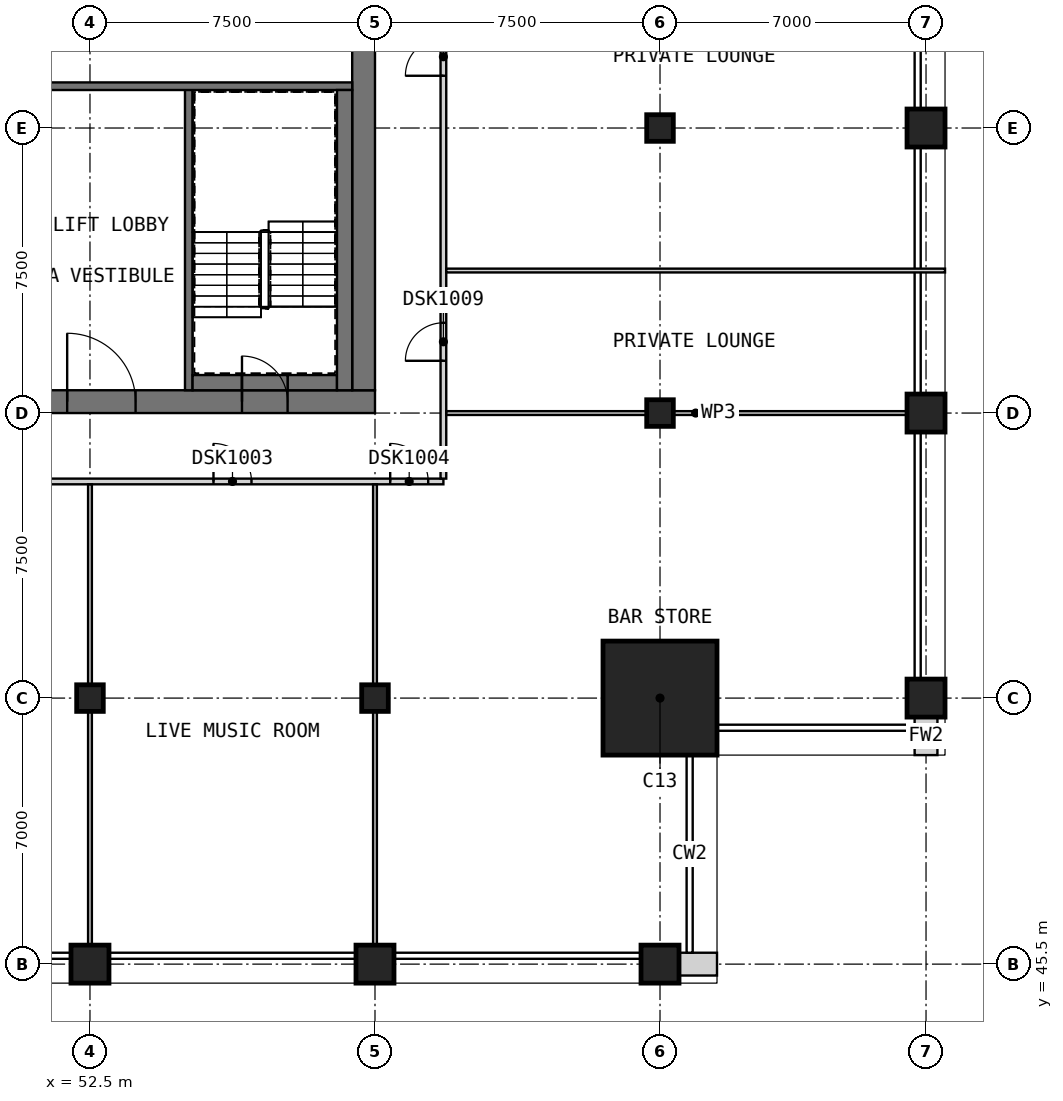
"""IFC4 building model, lengths in metres.
Left out: names, types, materials, properties, quantities, classifications, styles, units other than length and angle.
Written with IfcOpenShell. Run it as: python <this file> out.ifc"""

import sys

from ifc_helpers import new_model, si_unit, direction, frame, frame_2d, origin, origin_2d, place, context, subcontext, project, spatial, rectangle, extrude, element, fill, save


model = new_model("IFC4")
c1 = context("Model", 3, precision=1e-05, world=origin(), true_north=direction((0.0, 1.0)))
c2 = subcontext(c1, "Body", "Model", "MODEL_VIEW")
j1 = project(units=[si_unit("LENGTHUNIT", "METRE"), si_unit("PLANEANGLEUNIT", "RADIAN")], contexts=[c1])
p1 = place(None, origin())
s1 = spatial("IfcSite", under=j1, at=p1, CompositionType="ELEMENT")
p2 = place(p1, origin())
s2 = spatial("IfcBuilding", under=s1, at=p2, CompositionType="ELEMENT")
p3 = place(p2, frame((0.0, 0.0, 297.7)))
s3 = spatial("IfcBuildingStorey", under=s2, at=p3, CompositionType="ELEMENT", Elevation=297.7)
p4 = place(p3, frame((52.5, 45.5, 0.0), z_axis=(0.0, 0.0, 1.0), x_axis=(1.0, 0.0, 0.0)))
e1 = element("IfcColumn", 1, at=p4, inside=s3, PredefinedType="COLUMN", context=c2, shape_type="SweptSolid", body=[
    extrude(rectangle(XDim=1.0, YDim=1.0, at=origin_2d()), origin(), (0.0, 0.0, 1.0), 5.0),
])
p5 = place(p3, frame((52.5, 52.5, 0.0), z_axis=(0.0, 0.0, 1.0), x_axis=(1.0, 0.0, 0.0)))
e2 = element("IfcColumn", 2, at=p5, inside=s3, PredefinedType="COLUMN", context=c2, shape_type="SweptSolid", body=[
    extrude(rectangle(XDim=0.7, YDim=0.7, at=origin_2d()), origin(), (0.0, 0.0, 1.0), 5.0),
])
p6 = place(p3, frame((60.0, 45.5, 0.0), z_axis=(0.0, 0.0, 1.0), x_axis=(1.0, 0.0, 0.0)))
e3 = element("IfcColumn", 3, at=p6, inside=s3, PredefinedType="COLUMN", context=c2, shape_type="SweptSolid", body=[
    extrude(rectangle(XDim=1.0, YDim=1.0, at=origin_2d()), origin(), (0.0, 0.0, 1.0), 5.0),
])
p7 = place(p3, frame((60.0, 52.5, 0.0), z_axis=(0.0, 0.0, 1.0), x_axis=(1.0, 0.0, 0.0)))
e4 = element("IfcColumn", 4, at=p7, inside=s3, PredefinedType="COLUMN", context=c2, shape_type="SweptSolid", body=[
    extrude(rectangle(XDim=0.7, YDim=0.7, at=origin_2d()), origin(), (0.0, 0.0, 1.0), 5.0),
])
p8 = place(p3, frame((67.5, 45.5, 0.0), z_axis=(0.0, 0.0, 1.0), x_axis=(1.0, 0.0, 0.0)))
e5 = element("IfcColumn", 5, at=p8, inside=s3, PredefinedType="COLUMN", context=c2, shape_type="SweptSolid", body=[
    extrude(rectangle(XDim=1.0, YDim=1.0, at=origin_2d()), origin(), (0.0, 0.0, 1.0), 5.0),
])
for number, where, z_axis, x_axis in (
    (6, (67.5, 60.0, 0.0), (0.0, 0.0, 1.0), (1.0, 0.0, 0.0)),
    (7, (67.5, 67.5, 0.0), (0.0, 0.0, 1.0), (1.0, 0.0, 0.0)),
):
    element("IfcColumn", number, at=place(p3, frame(where, z_axis=z_axis, x_axis=x_axis)), inside=s3, PredefinedType="COLUMN", context=c2, shape_type="SweptSolid", body=[
        extrude(rectangle(XDim=0.7, YDim=0.7, at=origin_2d()), origin(), (0.0, 0.0, 1.0), 5.0),
    ])
for number, where, z_axis, x_axis in (
    (8, (74.5, 52.5, 0.0), (0.0, 0.0, 1.0), (1.0, 0.0, 0.0)),
    (9, (74.5, 60.0, 0.0), (0.0, 0.0, 1.0), (1.0, 0.0, 0.0)),
    (10, (74.5, 67.5, 0.0), (0.0, 0.0, 1.0), (1.0, 0.0, 0.0)),
):
    element("IfcColumn", number, at=place(p3, frame(where, z_axis=z_axis, x_axis=x_axis)), inside=s3, PredefinedType="COLUMN", context=c2, shape_type="SweptSolid", body=[
        extrude(rectangle(XDim=1.0, YDim=1.0, at=origin_2d()), origin(), (0.0, 0.0, 1.0), 5.0),
    ])
p9 = place(p3, frame((67.5, 52.5, 0.0), z_axis=(0.0, 0.0, 1.0), x_axis=(1.0, 0.0, 0.0)))
e11 = element("IfcColumn", 11, at=p9, inside=s3, PredefinedType="COLUMN", context=c2, shape_type="SweptSolid", body=[
    extrude(rectangle(XDim=3.0, YDim=3.0, at=origin_2d()), origin(), (0.0, 0.0, 1.0), 5.0),
])
p10 = place(p3, frame((30.0, 60.3, 0.0), z_axis=(0.0, 0.0, 1.0), x_axis=(1.0, 0.0, 0.0)))
e12 = element("IfcWall", 12, at=p10, inside=s3, PredefinedType="SHEAR", context=c2, shape_type="SweptSolid", body=[
    extrude(rectangle(XDim=30.0, YDim=0.6, at=frame_2d((15.0, 0.0))), origin(), (0.0, 0.0, 1.0), 5.0),
])
p11 = place(p10, frame((21.9, 0.0, 0.0)))
e13 = element("IfcOpeningElement", 13, at=p11, cuts=e12, PredefinedType="OPENING", context=c2, shape_type="SweptSolid", body=[
    extrude(rectangle(XDim=1.8, YDim=2.1, at=frame_2d((0.9, 1.05))), frame((0.0, 0.31, 0.0), z_axis=(0.0, -1.0, 0.0), x_axis=(1.0, 0.0, 0.0)), (0.0, 0.0, 1.0), 0.62),
])
p12 = place(p10, frame((26.5, 0.0, 0.0)))
e14 = element("IfcOpeningElement", 14, at=p12, cuts=e12, PredefinedType="OPENING", context=c2, shape_type="SweptSolid", body=[
    extrude(rectangle(XDim=1.2, YDim=2.1, at=frame_2d((0.6, 1.05))), frame((0.0, 0.31, 0.0), z_axis=(0.0, -1.0, 0.0), x_axis=(1.0, 0.0, 0.0)), (0.0, 0.0, 1.0), 0.62),
])
p13 = place(p3, frame((59.7, 60.6, 0.0), z_axis=(0.0, 0.0, 1.0), x_axis=(0.0, 1.0, 0.0)))
e15 = element("IfcWall", 15, at=p13, inside=s3, PredefinedType="SHEAR", context=c2, shape_type="SweptSolid", body=[
    extrude(rectangle(XDim=21.3, YDim=0.6, at=frame_2d((10.65, 0.0))), origin(), (0.0, 0.0, 1.0), 5.0),
])
p14 = place(p13, frame((14.9, 0.0, 0.0)))
e16 = element("IfcOpeningElement", 16, at=p14, cuts=e15, PredefinedType="OPENING", context=c2, shape_type="SweptSolid", body=[
    extrude(rectangle(XDim=1.8, YDim=2.1, at=frame_2d((0.9, 1.05))), frame((0.0, 0.31, 0.0), z_axis=(0.0, -1.0, 0.0), x_axis=(1.0, 0.0, 0.0)), (0.0, 0.0, 1.0), 0.62),
])
for number, where, z_axis, x_axis in (
    (17, (68.0, 45.5, 0.0), (0.0, 0.0, 1.0), (1.0, 0.0, 0.0)),
    (18, (74.5, 51.0, 0.0), (0.0, 0.0, 1.0), (0.0, 1.0, 0.0)),
):
    element("IfcWall", number, at=place(p3, frame(where, z_axis=z_axis, x_axis=x_axis)), inside=s3, PredefinedType="SOLIDWALL", context=c2, shape_type="SweptSolid", body=[
        extrude(rectangle(XDim=1.0, YDim=0.6, at=frame_2d((0.5, 0.0))), origin(), (0.0, 0.0, 1.0), 4.7),
    ])
p15 = place(p3, frame((55.1, 60.6, 0.0), z_axis=(0.0, 0.0, 1.0), x_axis=(0.0, 1.0, 0.0)))
e19 = element("IfcWall", 19, at=p15, inside=s3, PredefinedType="SOLIDWALL", context=c2, shape_type="SweptSolid", body=[
    extrude(rectangle(XDim=8.0, YDim=0.2, at=frame_2d((4.0, 0.0))), origin(), (0.0, 0.0, 1.0), 4.7),
])
p16 = place(p3, frame((51.1, 68.6, 0.0), z_axis=(0.0, 0.0, 1.0), x_axis=(1.0, 0.0, 0.0)))
e20 = element("IfcWall", 20, at=p16, inside=s3, PredefinedType="SOLIDWALL", context=c2, shape_type="SweptSolid", body=[
    extrude(rectangle(XDim=8.3, YDim=0.2, at=frame_2d((4.15, 0.0))), origin(), (0.0, 0.0, 1.0), 4.7),
])
for number, where, z_axis, x_axis in (
    (21, (55.2, 60.8, 0.0), (0.0, 0.0, 1.0), (1.0, 0.0, 0.0)),
    (22, (57.7, 60.8, 0.0), (0.0, 0.0, 1.0), (1.0, 0.0, 0.0)),
):
    element("IfcWall", number, at=place(p3, frame(where, z_axis=z_axis, x_axis=x_axis)), inside=s3, PredefinedType="SOLIDWALL", context=c2, shape_type="SweptSolid", body=[
        extrude(rectangle(XDim=1.3, YDim=0.4, at=frame_2d((0.65, 0.0))), origin(), (0.0, 0.0, 1.0), 4.7),
    ])
p17 = place(p3, frame((59.2, 60.6, 0.0), z_axis=(0.0, 0.0, 1.0), x_axis=(0.0, 1.0, 0.0)))
e23 = element("IfcWall", 23, at=p17, inside=s3, PredefinedType="SOLIDWALL", context=c2, shape_type="SweptSolid", body=[
    extrude(rectangle(XDim=7.9, YDim=0.4, at=frame_2d((3.95, 0.0))), origin(), (0.0, 0.0, 1.0), 4.7),
])
p18 = place(p3, frame((56.5, 60.8, 3.2), z_axis=(0.0, 0.0, 1.0), x_axis=(1.0, 0.0, 0.0)))
e24 = element("IfcWall", 24, at=p18, inside=s3, PredefinedType="SOLIDWALL", context=c2, shape_type="SweptSolid", body=[
    extrude(rectangle(XDim=1.2, YDim=0.4, at=frame_2d((0.6, 0.0))), origin(), (0.0, 0.0, 1.0), 1.5),
])
p19 = place(p3, frame((33.75, 58.2, 0.0), z_axis=(0.0, 0.0, 1.0), x_axis=(1.0, 0.0, 0.0)))
e25 = element("IfcWall", 25, at=p19, inside=s3, PredefinedType="PARTITIONING", context=c2, shape_type="SweptSolid", body=[
    extrude(rectangle(XDim=28.05, YDim=0.15, at=frame_2d((14.025, 0.0))), origin(), (0.0, 0.0, 1.0), 4.7),
])
p20 = place(p19, frame((3.25, 0.0, 0.0)))
e26 = element("IfcOpeningElement", 26, at=p20, cuts=e25, PredefinedType="OPENING", context=c2, shape_type="SweptSolid", body=[
    extrude(rectangle(XDim=1.0, YDim=2.1, at=frame_2d((0.5, 1.05))), frame((0.0, 0.085, 0.0), z_axis=(0.0, -1.0, 0.0), x_axis=(1.0, 0.0, 0.0)), (0.0, 0.0, 1.0), 0.17),
])
p21 = place(p19, frame((12.225, 0.0, 0.0)))
e27 = element("IfcOpeningElement", 27, at=p21, cuts=e25, PredefinedType="OPENING", context=c2, shape_type="SweptSolid", body=[
    extrude(rectangle(XDim=1.8, YDim=2.1, at=frame_2d((0.9, 1.05))), frame((0.0, 0.085, 0.0), z_axis=(0.0, -1.0, 0.0), x_axis=(1.0, 0.0, 0.0)), (0.0, 0.0, 1.0), 0.17),
])
p22 = place(p19, frame((22.0, 0.0, 0.0)))
e28 = element("IfcOpeningElement", 28, at=p22, cuts=e25, PredefinedType="OPENING", context=c2, shape_type="SweptSolid", body=[
    extrude(rectangle(XDim=1.0, YDim=2.1, at=frame_2d((0.5, 1.05))), frame((0.0, 0.085, 0.0), z_axis=(0.0, -1.0, 0.0), x_axis=(1.0, 0.0, 0.0)), (0.0, 0.0, 1.0), 0.17),
])
p23 = place(p19, frame((26.65, 0.0, 0.0)))
e29 = element("IfcOpeningElement", 29, at=p23, cuts=e25, PredefinedType="OPENING", context=c2, shape_type="SweptSolid", body=[
    extrude(rectangle(XDim=1.0, YDim=2.1, at=frame_2d((0.5, 1.05))), frame((0.0, 0.085, 0.0), z_axis=(0.0, -1.0, 0.0), x_axis=(1.0, 0.0, 0.0)), (0.0, 0.0, 1.0), 0.17),
])
p24 = place(p3, frame((61.8, 58.275, 0.0), z_axis=(0.0, 0.0, 1.0), x_axis=(0.0, 1.0, 0.0)))
e30 = element("IfcWall", 30, at=p24, inside=s3, PredefinedType="PARTITIONING", context=c2, shape_type="SweptSolid", body=[
    extrude(rectangle(XDim=25.95, YDim=0.15, at=frame_2d((12.975, 0.0))), origin(), (0.0, 0.0, 1.0), 4.7),
])
p25 = place(p24, frame((3.1, 0.0, 0.0)))
e31 = element("IfcOpeningElement", 31, at=p25, cuts=e30, PredefinedType="OPENING", context=c2, shape_type="SweptSolid", body=[
    extrude(rectangle(XDim=1.0, YDim=2.1, at=frame_2d((0.5, 1.05))), frame((0.0, 0.085, 0.0), z_axis=(0.0, -1.0, 0.0), x_axis=(1.0, 0.0, 0.0)), (0.0, 0.0, 1.0), 0.17),
])
p26 = place(p24, frame((10.6, 0.0, 0.0)))
e32 = element("IfcOpeningElement", 32, at=p26, cuts=e30, PredefinedType="OPENING", context=c2, shape_type="SweptSolid", body=[
    extrude(rectangle(XDim=1.0, YDim=2.1, at=frame_2d((0.5, 1.05))), frame((0.0, 0.085, 0.0), z_axis=(0.0, -1.0, 0.0), x_axis=(1.0, 0.0, 0.0)), (0.0, 0.0, 1.0), 0.17),
])
p27 = place(p24, frame((18.15, 0.0, 0.0)))
e33 = element("IfcOpeningElement", 33, at=p27, cuts=e30, PredefinedType="OPENING", context=c2, shape_type="SweptSolid", body=[
    extrude(rectangle(XDim=0.9, YDim=2.1, at=frame_2d((0.45, 1.05))), frame((0.0, 0.085, 0.0), z_axis=(0.0, -1.0, 0.0), x_axis=(1.0, 0.0, 0.0)), (0.0, 0.0, 1.0), 0.17),
])
for number, where, z_axis, x_axis in (
    (34, (61.875, 60.0, 0.0), (0.0, 0.0, 1.0), (1.0, 0.0, 0.0)),
    (35, (61.875, 63.75, 0.0), (0.0, 0.0, 1.0), (1.0, 0.0, 0.0)),
    (36, (52.5, 45.0, 0.0), (0.0, 0.0, 1.0), (0.0, 1.0, 0.0)),
    (37, (60.0, 45.0, 0.0), (0.0, 0.0, 1.0), (0.0, 1.0, 0.0)),
):
    element("IfcWall", number, at=place(p3, frame(where, z_axis=z_axis, x_axis=x_axis)), inside=s3, PredefinedType="PARTITIONING", context=c2, shape_type="SweptSolid", body=[
        extrude(rectangle(XDim=13.125, YDim=0.1, at=frame_2d((6.562, 0.0))), origin(), (0.0, 0.0, 1.0), 4.7),
    ])
p28 = place(p11, origin())
e38 = element("IfcDoor", 38, at=p28, inside=s3, OperationType="DOUBLE_DOOR_SINGLE_SWING", PredefinedType="DOOR", context=c2, shape_type="SweptSolid", body=[
    extrude(rectangle(XDim=1.8, YDim=2.1, at=frame_2d((0.9, 1.05))), frame((0.0, 0.025, 0.0), z_axis=(0.0, -1.0, 0.0), x_axis=(1.0, 0.0, 0.0)), (0.0, 0.0, 1.0), 0.05),
])
fill(e13, e38)
p29 = place(p12, origin())
e39 = element("IfcDoor", 39, at=p29, inside=s3, OperationType="SINGLE_SWING_LEFT", PredefinedType="DOOR", context=c2, shape_type="SweptSolid", body=[
    extrude(rectangle(XDim=1.2, YDim=2.1, at=frame_2d((0.6, 1.05))), frame((0.0, 0.025, 0.0), z_axis=(0.0, -1.0, 0.0), x_axis=(1.0, 0.0, 0.0)), (0.0, 0.0, 1.0), 0.05),
])
fill(e14, e39)
p30 = place(p22, origin())
e40 = element("IfcDoor", 40, at=p30, inside=s3, OperationType="SINGLE_SWING_RIGHT", PredefinedType="DOOR", context=c2, shape_type="SweptSolid", body=[
    extrude(rectangle(XDim=1.0, YDim=2.1, at=frame_2d((0.5, 1.05))), frame((0.0, 0.025, 0.0), z_axis=(0.0, -1.0, 0.0), x_axis=(1.0, 0.0, 0.0)), (0.0, 0.0, 1.0), 0.05),
])
fill(e28, e40)
p31 = place(p23, origin())
e41 = element("IfcDoor", 41, at=p31, inside=s3, OperationType="SINGLE_SWING_RIGHT", PredefinedType="DOOR", context=c2, shape_type="SweptSolid", body=[
    extrude(rectangle(XDim=1.0, YDim=2.1, at=frame_2d((0.5, 1.05))), frame((0.0, 0.025, 0.0), z_axis=(0.0, -1.0, 0.0), x_axis=(1.0, 0.0, 0.0)), (0.0, 0.0, 1.0), 0.05),
])
fill(e29, e41)
p32 = place(p25, origin())
e42 = element("IfcDoor", 42, at=p32, inside=s3, OperationType="SINGLE_SWING_RIGHT", PredefinedType="DOOR", context=c2, shape_type="SweptSolid", body=[
    extrude(rectangle(XDim=1.0, YDim=2.1, at=frame_2d((0.5, 1.05))), frame((0.0, 0.025, 0.0), z_axis=(0.0, -1.0, 0.0), x_axis=(1.0, 0.0, 0.0)), (0.0, 0.0, 1.0), 0.05),
])
fill(e31, e42)
p33 = place(p26, origin())
e43 = element("IfcDoor", 43, at=p33, inside=s3, OperationType="SINGLE_SWING_RIGHT", PredefinedType="DOOR", context=c2, shape_type="SweptSolid", body=[
    extrude(rectangle(XDim=1.0, YDim=2.1, at=frame_2d((0.5, 1.05))), frame((0.0, 0.025, 0.0), z_axis=(0.0, -1.0, 0.0), x_axis=(1.0, 0.0, 0.0)), (0.0, 0.0, 1.0), 0.05),
])
fill(e32, e43)
save(model, sys.argv[1])
